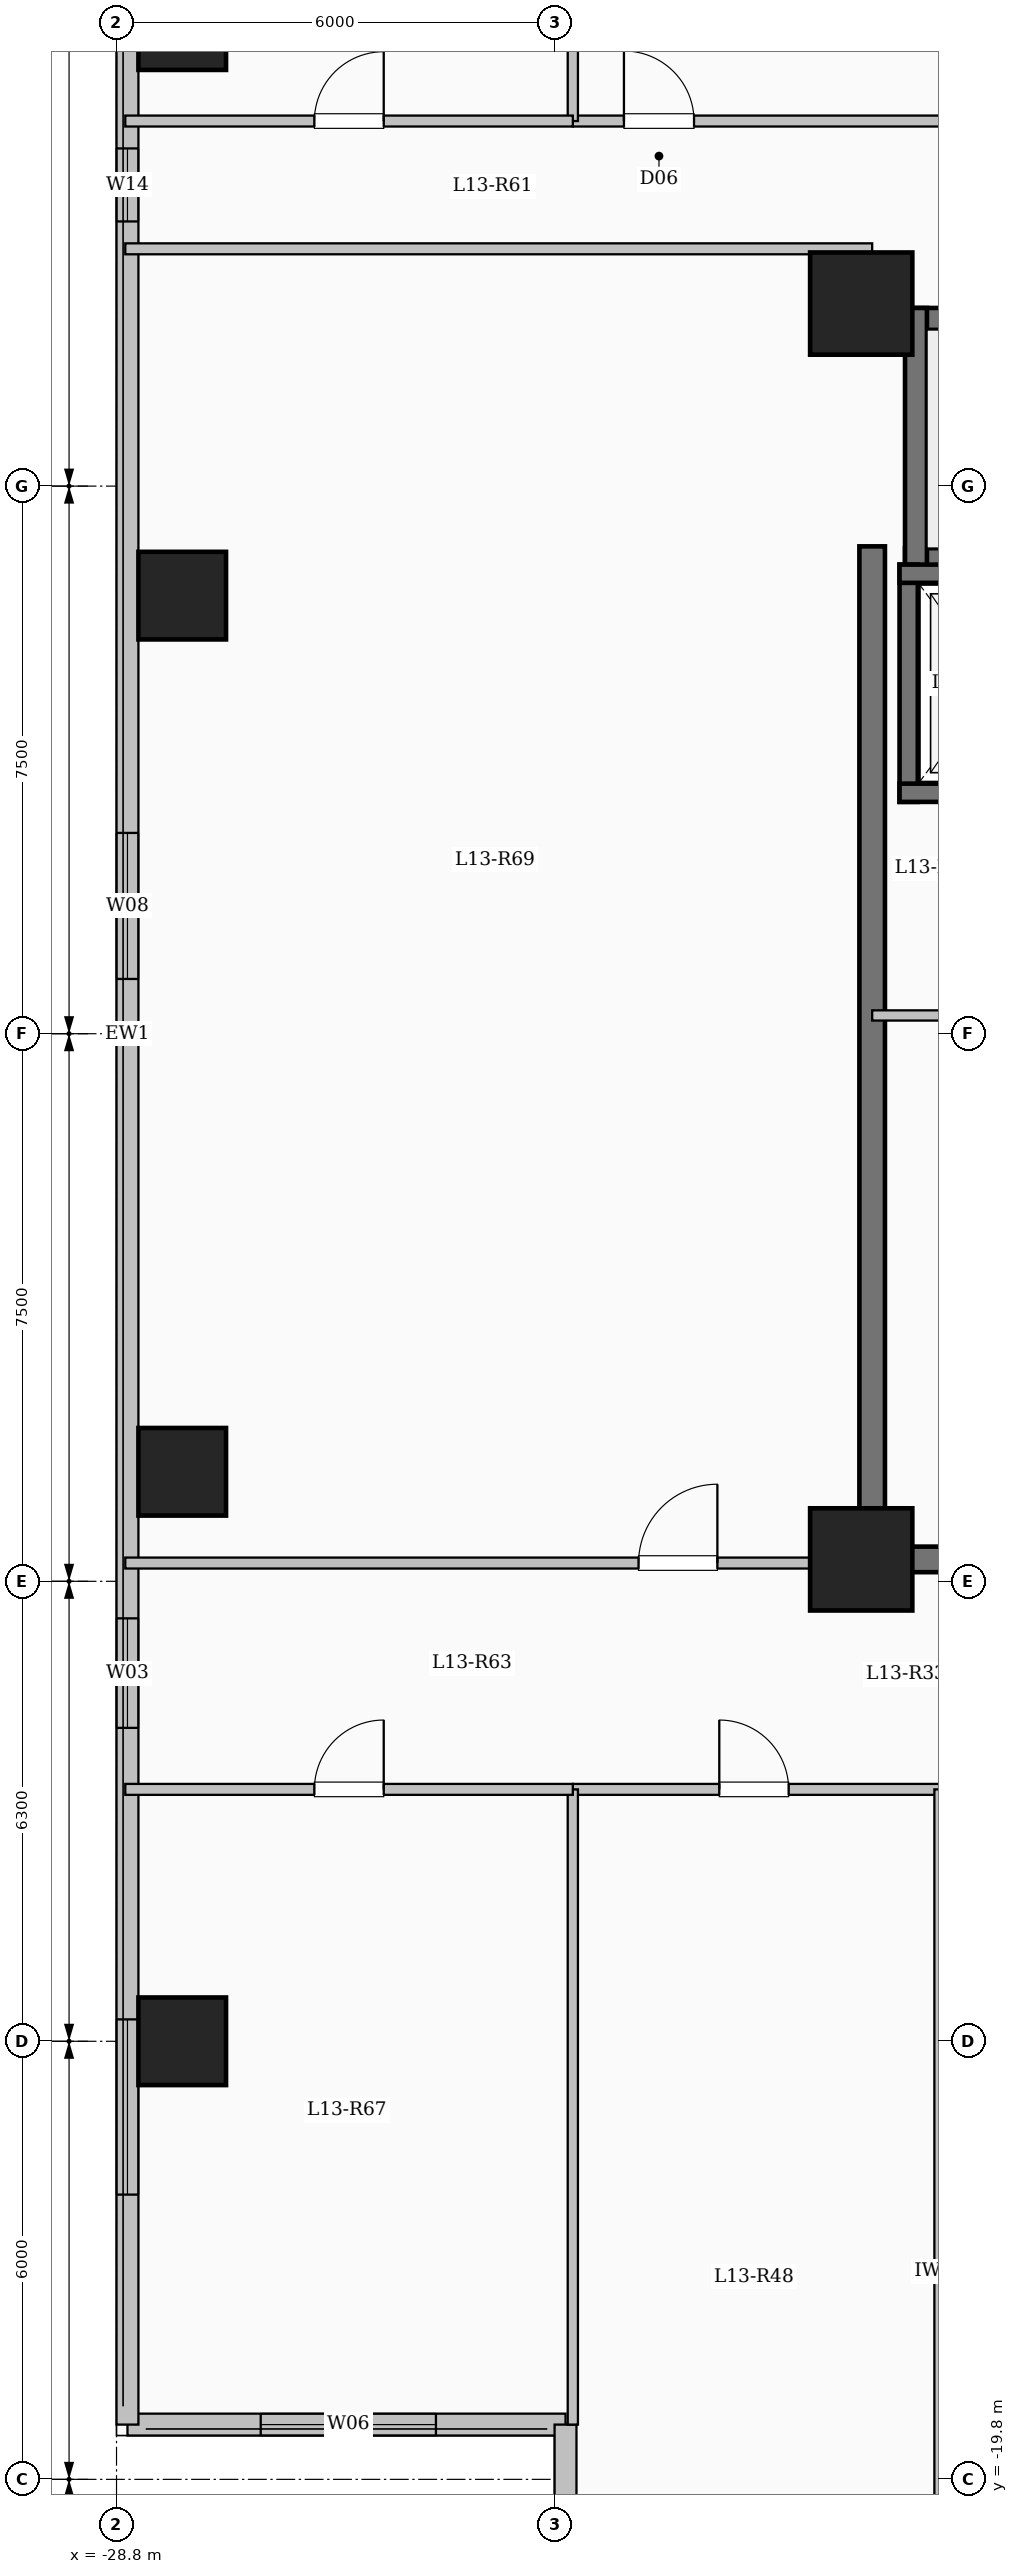
"""IFC4 building model, lengths in metres.
Left out: names, types, materials, properties, quantities, classifications, styles, units other than length and angle.
Written with IfcOpenShell. Run it as: python <this file> out.ifc"""

import sys

from ifc_helpers import new_model, si_unit, direction, frame, frame_2d, origin, origin_2d, place, context, subcontext, project, spatial, rectangle, extrude, element, fill, save


model = new_model("IFC4")
c1 = context("Model", 3, precision=1e-05, world=origin(), true_north=direction((0.0, 1.0)))
c2 = subcontext(c1, "Body", "Model", "MODEL_VIEW")
j1 = project(units=[si_unit("LENGTHUNIT", "METRE"), si_unit("PLANEANGLEUNIT", "RADIAN")], contexts=[c1])
p1 = place(None, origin())
s1 = spatial("IfcSite", under=j1, at=p1, CompositionType="ELEMENT")
p2 = place(p1, origin())
s2 = spatial("IfcBuilding", under=s1, at=p2, CompositionType="ELEMENT")
p3 = place(p2, frame((0.0, 0.0, 50.8)))
s3 = spatial("IfcBuildingStorey", under=s2, at=p3, CompositionType="ELEMENT", Elevation=50.8)
for number, where, z_axis, x_axis in (
    (1, (-18.6, -7.2, 0.0), (0.0, 0.0, 1.0), (1.0, 0.0, 0.0)),
    (2, (-18.6, 10.0, 0.0), (0.0, 0.0, 1.0), (1.0, 0.0, 0.0)),
):
    element("IfcColumn", number, at=place(p3, frame(where, z_axis=z_axis, x_axis=x_axis)), inside=s3, PredefinedType="COLUMN", context=c2, shape_type="SweptSolid", body=[
        extrude(rectangle(XDim=1.4, YDim=1.4, at=origin_2d()), origin(), (0.0, 0.0, 1.0), 3.35),
    ])
for number, where, z_axis, x_axis in (
    (3, (-27.9, -13.8, 0.0), (0.0, 0.0, 1.0), (1.0, 0.0, 0.0)),
    (4, (-27.9, -6.0, 0.0), (0.0, 0.0, 1.0), (1.0, 0.0, 0.0)),
    (5, (-27.9, 6.0, 0.0), (0.0, 0.0, 1.0), (1.0, 0.0, 0.0)),
    (6, (-27.9, 13.8, 0.0), (0.0, 0.0, 1.0), (1.0, 0.0, 0.0)),
):
    element("IfcColumn", number, at=place(p3, frame(where, z_axis=z_axis, x_axis=x_axis)), inside=s3, PredefinedType="COLUMN", context=c2, shape_type="SweptSolid", body=[
        extrude(rectangle(XDim=1.2, YDim=1.2, at=origin_2d()), origin(), (0.0, 0.0, 1.0), 3.35),
    ])
p4 = place(p3, frame((-22.65, -19.05, 0.0), z_axis=(0.0, 0.0, 1.0), x_axis=(-1.0, 0.0, 0.0)))
e7 = element("IfcWall", 7, at=p4, inside=s3, PredefinedType="SOLIDWALL", context=c2, shape_type="SweptSolid", body=[
    extrude(rectangle(XDim=6.0, YDim=0.3, at=frame_2d((3.0, 0.0))), origin(), (0.0, 0.0, 1.0), 3.1),
])
p5 = place(p4, frame((1.775, 0.0, 0.9)))
e8 = element("IfcOpeningElement", 8, at=p5, cuts=e7, PredefinedType="OPENING", context=c2, shape_type="SweptSolid", body=[
    extrude(rectangle(XDim=2.4, YDim=1.8, at=frame_2d((1.2, 0.9))), frame((0.0, 0.16, 0.0), z_axis=(0.0, -1.0, 0.0), x_axis=(1.0, 0.0, 0.0)), (0.0, 0.0, 1.0), 0.32),
])
p6 = place(p3, frame((-28.65, -19.05, 0.0), z_axis=(0.0, 0.0, 1.0), x_axis=(0.0, 1.0, 0.0)))
e9 = element("IfcWall", 9, at=p6, inside=s3, PredefinedType="SOLIDWALL", context=c2, shape_type="SweptSolid", body=[
    extrude(rectangle(XDim=38.1, YDim=0.3, at=frame_2d((19.05, 0.0))), origin(), (0.0, 0.0, 1.0), 3.1),
])
p7 = place(p6, frame((3.15, 0.0, 0.9)))
e10 = element("IfcOpeningElement", 10, at=p7, cuts=e9, PredefinedType="OPENING", context=c2, shape_type="SweptSolid", body=[
    extrude(rectangle(XDim=2.4, YDim=1.8, at=frame_2d((1.2, 0.9))), frame((0.0, 0.16, 0.0), z_axis=(0.0, -1.0, 0.0), x_axis=(1.0, 0.0, 0.0)), (0.0, 0.0, 1.0), 0.32),
])
p8 = place(p6, frame((9.542, 0.0, 0.9)))
e11 = element("IfcOpeningElement", 11, at=p8, cuts=e9, PredefinedType="OPENING", context=c2, shape_type="SweptSolid", body=[
    extrude(rectangle(XDim=1.5, YDim=1.65, at=frame_2d((0.75, 0.825))), frame((0.0, 0.16, 0.0), z_axis=(0.0, -1.0, 0.0), x_axis=(1.0, 0.0, 0.0)), (0.0, 0.0, 1.0), 0.32),
])
p9 = place(p6, frame((19.8, 0.0, 0.9)))
e12 = element("IfcOpeningElement", 12, at=p9, cuts=e9, PredefinedType="OPENING", context=c2, shape_type="SweptSolid", body=[
    extrude(rectangle(XDim=2.0, YDim=1.7, at=frame_2d((1.0, 0.85))), frame((0.0, 0.16, 0.0), z_axis=(0.0, -1.0, 0.0), x_axis=(1.0, 0.0, 0.0)), (0.0, 0.0, 1.0), 0.32),
])
p10 = place(p6, frame((30.175, 0.0, 0.95)))
e13 = element("IfcOpeningElement", 13, at=p10, cuts=e9, PredefinedType="OPENING", context=c2, shape_type="SweptSolid", body=[
    extrude(rectangle(XDim=1.0, YDim=1.5, at=frame_2d((0.5, 0.75))), frame((0.0, 0.16, 0.0), z_axis=(0.0, -1.0, 0.0), x_axis=(1.0, 0.0, 0.0)), (0.0, 0.0, 1.0), 0.32),
])
p11 = place(p6, frame((33.85, 0.0, 0.9)))
e14 = element("IfcOpeningElement", 14, at=p11, cuts=e9, PredefinedType="OPENING", context=c2, shape_type="SweptSolid", body=[
    extrude(rectangle(XDim=2.0, YDim=1.7, at=frame_2d((1.0, 0.85))), frame((0.0, 0.16, 0.0), z_axis=(0.0, -1.0, 0.0), x_axis=(1.0, 0.0, 0.0)), (0.0, 0.0, 1.0), 0.32),
])
p12 = place(p3, frame((-22.65, -23.55, 0.0), z_axis=(0.0, 0.0, 1.0), x_axis=(0.0, 1.0, 0.0)))
e15 = element("IfcWall", 15, at=p12, inside=s3, PredefinedType="SOLIDWALL", context=c2, shape_type="SweptSolid", body=[
    extrude(rectangle(XDim=4.5, YDim=0.3, at=frame_2d((2.25, 0.0))), origin(), (0.0, 0.0, 1.0), 3.1),
])
p13 = place(p12, frame((1.268, 0.0, 0.9)))
e16 = element("IfcOpeningElement", 16, at=p13, cuts=e15, PredefinedType="OPENING", context=c2, shape_type="SweptSolid", body=[
    extrude(rectangle(XDim=2.0, YDim=1.7, at=frame_2d((1.0, 0.85))), frame((0.0, 0.16, 0.0), z_axis=(0.0, -1.0, 0.0), x_axis=(1.0, 0.0, 0.0)), (0.0, 0.0, 1.0), 0.32),
])
p14 = place(p3, frame((-18.0, 9.79, 0.0), z_axis=(0.0, 0.0, 1.0), x_axis=(1.0, 0.0, 0.0)))
e17 = element("IfcWall", 17, at=p14, inside=s3, PredefinedType="SHEAR", context=c2, shape_type="SweptSolid", body=[
    extrude(rectangle(XDim=8.0, YDim=0.3, at=frame_2d((4.0, 0.0))), origin(), (0.0, 0.0, 1.0), 3.35),
])
p15 = place(p3, frame((-18.0, 6.5, 0.0), z_axis=(0.0, 0.0, 1.0), x_axis=(1.0, 0.0, 0.0)))
e18 = element("IfcWall", 18, at=p15, inside=s3, PredefinedType="SHEAR", context=c2, shape_type="SweptSolid", body=[
    extrude(rectangle(XDim=8.0, YDim=0.3, at=frame_2d((4.0, 0.0))), origin(), (0.0, 0.0, 1.0), 3.35),
])
p16 = place(p15, frame((6.45, 0.0, 0.0)))
e19 = element("IfcOpeningElement", 19, at=p16, cuts=e18, PredefinedType="OPENING", context=c2, shape_type="SweptSolid", body=[
    extrude(rectangle(XDim=1.0, YDim=2.15, at=frame_2d((0.5, 1.075))), frame((0.0, 0.16, 0.0), z_axis=(0.0, -1.0, 0.0), x_axis=(1.0, 0.0, 0.0)), (0.0, 0.0, 1.0), 0.32),
])
p17 = place(p3, frame((-17.85, 6.35, 0.0), z_axis=(0.0, 0.0, 1.0), x_axis=(0.0, 1.0, 0.0)))
e20 = element("IfcWall", 20, at=p17, inside=s3, PredefinedType="SHEAR", context=c2, shape_type="SweptSolid", body=[
    extrude(rectangle(XDim=3.59, YDim=0.3, at=frame_2d((1.795, 0.0))), origin(), (0.0, 0.0, 1.0), 3.35),
])
p18 = place(p3, frame((-17.95, 3.175, 0.0), z_axis=(0.0, 0.0, 1.0), x_axis=(0.0, 1.0, 0.0)))
e21 = element("IfcWall", 21, at=p18, inside=s3, PredefinedType="SHEAR", context=c2, shape_type="SweptSolid", body=[
    extrude(rectangle(XDim=3.25, YDim=0.25, at=frame_2d((1.625, 0.0))), origin(), (0.0, 0.0, 1.0), 3.35),
])
for number, where, z_axis, x_axis in (
    (22, (-18.075, 3.3, 0.0), (0.0, 0.0, 1.0), (1.0, 0.0, 0.0)),
    (23, (-18.075, 6.3, 0.0), (0.0, 0.0, 1.0), (1.0, 0.0, 0.0)),
):
    element("IfcWall", number, at=place(p3, frame(where, z_axis=z_axis, x_axis=x_axis)), inside=s3, PredefinedType="SHEAR", context=c2, shape_type="SweptSolid", body=[
        extrude(rectangle(XDim=2.55, YDim=0.25, at=frame_2d((1.275, 0.0))), origin(), (0.0, 0.0, 1.0), 3.35),
    ])
p19 = place(p3, frame((-18.45, -7.375, 0.0), z_axis=(0.0, 0.0, 1.0), x_axis=(0.0, 1.0, 0.0)))
e24 = element("IfcWall", 24, at=p19, inside=s3, PredefinedType="SHEAR", context=c2, shape_type="SweptSolid", body=[
    extrude(rectangle(XDim=14.05, YDim=0.35, at=frame_2d((7.025, 0.0))), origin(), (0.0, 0.0, 1.0), 3.35),
])
p20 = place(p3, frame((-18.625, -7.2, 0.0), z_axis=(0.0, 0.0, 1.0), x_axis=(1.0, 0.0, 0.0)))
e25 = element("IfcWall", 25, at=p20, inside=s3, PredefinedType="SHEAR", context=c2, shape_type="SweptSolid", body=[
    extrude(rectangle(XDim=8.55, YDim=0.35, at=frame_2d((4.275, 0.0))), origin(), (0.0, 0.0, 1.0), 3.35),
])
p21 = place(p3, frame((-18.45, 0.25, 0.0), z_axis=(0.0, 0.0, 1.0), x_axis=(1.0, 0.0, 0.0)))
e26 = element("IfcWall", 26, at=p21, inside=s3, PredefinedType="PARTITIONING", context=c2, shape_type="SweptSolid", body=[
    extrude(rectangle(XDim=3.05, YDim=0.14, at=frame_2d((1.525, 0.0))), origin(), (0.0, 0.0, 1.0), 3.1),
])
p22 = place(p21, frame((1.05, 0.0, 0.0)))
e27 = element("IfcOpeningElement", 27, at=p22, cuts=e26, PredefinedType="OPENING", context=c2, shape_type="SweptSolid", body=[
    extrude(rectangle(XDim=0.9, YDim=2.08, at=frame_2d((0.45, 1.04))), frame((0.0, 0.08, 0.0), z_axis=(0.0, -1.0, 0.0), x_axis=(1.0, 0.0, 0.0)), (0.0, 0.0, 1.0), 0.16),
])
p23 = place(p3, frame((-22.55, 12.5, 0.0), z_axis=(0.0, 0.0, 1.0), x_axis=(1.0, 0.0, 0.0)))
e28 = element("IfcWall", 28, at=p23, inside=s3, PredefinedType="PARTITIONING", context=c2, shape_type="SweptSolid", body=[
    extrude(rectangle(XDim=18.7, YDim=0.15, at=frame_2d((9.35, 0.0))), origin(), (0.0, 0.0, 1.0), 3.1),
])
p24 = place(p23, frame((0.7, 0.0, 0.0)))
e29 = element("IfcOpeningElement", 29, at=p24, cuts=e28, PredefinedType="OPENING", context=c2, shape_type="SweptSolid", body=[
    extrude(rectangle(XDim=0.96, YDim=2.15, at=frame_2d((0.48, 1.075))), frame((0.0, 0.085, 0.0), z_axis=(0.0, -1.0, 0.0), x_axis=(1.0, 0.0, 0.0)), (0.0, 0.0, 1.0), 0.17),
])
p25 = place(p3, frame((-22.55, -10.35, 0.0), z_axis=(0.0, 0.0, 1.0), x_axis=(1.0, 0.0, 0.0)))
e30 = element("IfcWall", 30, at=p25, inside=s3, PredefinedType="PARTITIONING", context=c2, shape_type="SweptSolid", body=[
    extrude(rectangle(XDim=14.0, YDim=0.15, at=frame_2d((7.0, 0.0))), origin(), (0.0, 0.0, 1.0), 3.1),
])
p26 = place(p25, frame((2.006, 0.0, 0.0)))
e31 = element("IfcOpeningElement", 31, at=p26, cuts=e30, PredefinedType="OPENING", context=c2, shape_type="SweptSolid", body=[
    extrude(rectangle(XDim=0.95, YDim=2.15, at=frame_2d((0.475, 1.075))), frame((0.0, 0.085, 0.0), z_axis=(0.0, -1.0, 0.0), x_axis=(1.0, 0.0, 0.0)), (0.0, 0.0, 1.0), 0.17),
])
p27 = place(p25, frame((7.058, 0.0, 0.0)))
e32 = element("IfcOpeningElement", 32, at=p27, cuts=e30, PredefinedType="OPENING", context=c2, shape_type="SweptSolid", body=[
    extrude(rectangle(XDim=0.95, YDim=2.15, at=frame_2d((0.475, 1.075))), frame((0.0, 0.085, 0.0), z_axis=(0.0, -1.0, 0.0), x_axis=(1.0, 0.0, 0.0)), (0.0, 0.0, 1.0), 0.17),
])
p28 = place(p25, frame((11.552, 0.0, 0.0)))
e33 = element("IfcOpeningElement", 33, at=p28, cuts=e30, PredefinedType="OPENING", context=c2, shape_type="SweptSolid", body=[
    extrude(rectangle(XDim=0.95, YDim=2.15, at=frame_2d((0.475, 1.075))), frame((0.0, 0.085, 0.0), z_axis=(0.0, -1.0, 0.0), x_axis=(1.0, 0.0, 0.0)), (0.0, 0.0, 1.0), 0.17),
])
p29 = place(p3, frame((-17.528, -23.55, 0.0), z_axis=(0.0, 0.0, 1.0), x_axis=(0.0, 1.0, 0.0)))
e34 = element("IfcWall", 34, at=p29, inside=s3, PredefinedType="PARTITIONING", context=c2, shape_type="SweptSolid", body=[
    extrude(rectangle(XDim=13.2, YDim=0.14, at=frame_2d((6.6, 0.0))), origin(), (0.0, 0.0, 1.0), 3.1),
])
p30 = place(p3, frame((-28.68, -7.25, 0.0), z_axis=(0.0, 0.0, 1.0), x_axis=(1.0, 0.0, 0.0)))
e35 = element("IfcWall", 35, at=p30, inside=s3, PredefinedType="PARTITIONING", context=c2, shape_type="SweptSolid", body=[
    extrude(rectangle(XDim=10.23, YDim=0.15, at=frame_2d((5.115, 0.0))), origin(), (0.0, 0.0, 1.0), 3.1),
])
p31 = place(p30, frame((7.03, 0.0, 0.0)))
e36 = element("IfcOpeningElement", 36, at=p31, cuts=e35, PredefinedType="OPENING", context=c2, shape_type="SweptSolid", body=[
    extrude(rectangle(XDim=1.08, YDim=2.15, at=frame_2d((0.54, 1.075))), frame((0.0, 0.085, 0.0), z_axis=(0.0, -1.0, 0.0), x_axis=(1.0, 0.0, 0.0)), (0.0, 0.0, 1.0), 0.17),
])
p32 = place(p3, frame((-28.68, 10.75, 0.0), z_axis=(0.0, 0.0, 1.0), x_axis=(1.0, 0.0, 0.0)))
e37 = element("IfcWall", 37, at=p32, inside=s3, PredefinedType="PARTITIONING", context=c2, shape_type="SweptSolid", body=[
    extrude(rectangle(XDim=10.23, YDim=0.15, at=frame_2d((5.115, 0.0))), origin(), (0.0, 0.0, 1.0), 3.1),
])
p33 = place(p3, frame((-22.55, -19.05, 0.0), z_axis=(0.0, 0.0, 1.0), x_axis=(0.0, 1.0, 0.0)))
e38 = element("IfcWall", 38, at=p33, inside=s3, PredefinedType="PARTITIONING", context=c2, shape_type="SweptSolid", body=[
    extrude(rectangle(XDim=8.7, YDim=0.14, at=frame_2d((4.35, 0.0))), origin(), (0.0, 0.0, 1.0), 3.1),
])
p34 = place(p3, frame((-22.55, 12.5, 0.0), z_axis=(0.0, 0.0, 1.0), x_axis=(0.0, 1.0, 0.0)))
e39 = element("IfcWall", 39, at=p34, inside=s3, PredefinedType="PARTITIONING", context=c2, shape_type="SweptSolid", body=[
    extrude(rectangle(XDim=6.55, YDim=0.14, at=frame_2d((3.275, 0.0))), origin(), (0.0, 0.0, 1.0), 3.1),
])
p35 = place(p3, frame((-28.68, 12.5, 0.0), z_axis=(0.0, 0.0, 1.0), x_axis=(1.0, 0.0, 0.0)))
e40 = element("IfcWall", 40, at=p35, inside=s3, PredefinedType="PARTITIONING", context=c2, shape_type="SweptSolid", body=[
    extrude(rectangle(XDim=6.13, YDim=0.15, at=frame_2d((3.065, 0.0))), origin(), (0.0, 0.0, 1.0), 3.1),
])
p36 = place(p35, frame((2.59, 0.0, 0.0)))
e41 = element("IfcOpeningElement", 41, at=p36, cuts=e40, PredefinedType="OPENING", context=c2, shape_type="SweptSolid", body=[
    extrude(rectangle(XDim=0.95, YDim=2.15, at=frame_2d((0.475, 1.075))), frame((0.0, 0.085, 0.0), z_axis=(0.0, -1.0, 0.0), x_axis=(1.0, 0.0, 0.0)), (0.0, 0.0, 1.0), 0.17),
])
p37 = place(p3, frame((-28.68, -10.35, 0.0), z_axis=(0.0, 0.0, 1.0), x_axis=(1.0, 0.0, 0.0)))
e42 = element("IfcWall", 42, at=p37, inside=s3, PredefinedType="PARTITIONING", context=c2, shape_type="SweptSolid", body=[
    extrude(rectangle(XDim=6.13, YDim=0.15, at=frame_2d((3.065, 0.0))), origin(), (0.0, 0.0, 1.0), 3.1),
])
p38 = place(p37, frame((2.59, 0.0, 0.0)))
e43 = element("IfcOpeningElement", 43, at=p38, cuts=e42, PredefinedType="OPENING", context=c2, shape_type="SweptSolid", body=[
    extrude(rectangle(XDim=0.95, YDim=2.15, at=frame_2d((0.475, 1.075))), frame((0.0, 0.085, 0.0), z_axis=(0.0, -1.0, 0.0), x_axis=(1.0, 0.0, 0.0)), (0.0, 0.0, 1.0), 0.17),
])
p39 = place(p5, origin())
e44 = element("IfcWindow", 44, at=p39, inside=s3, PartitioningType="SINGLE_PANEL", PredefinedType="WINDOW", context=c2, shape_type="SweptSolid", body=[
    extrude(rectangle(XDim=2.4, YDim=1.8, at=frame_2d((1.2, 0.9))), frame((0.0, 0.03, 0.0), z_axis=(0.0, -1.0, 0.0), x_axis=(1.0, 0.0, 0.0)), (0.0, 0.0, 1.0), 0.06),
])
fill(e8, e44)
p40 = place(p7, origin())
e45 = element("IfcWindow", 45, at=p40, inside=s3, PartitioningType="SINGLE_PANEL", PredefinedType="WINDOW", context=c2, shape_type="SweptSolid", body=[
    extrude(rectangle(XDim=2.4, YDim=1.8, at=frame_2d((1.2, 0.9))), frame((0.0, 0.03, 0.0), z_axis=(0.0, -1.0, 0.0), x_axis=(1.0, 0.0, 0.0)), (0.0, 0.0, 1.0), 0.06),
])
fill(e10, e45)
p41 = place(p8, origin())
e46 = element("IfcWindow", 46, at=p41, inside=s3, PartitioningType="SINGLE_PANEL", PredefinedType="WINDOW", context=c2, shape_type="SweptSolid", body=[
    extrude(rectangle(XDim=1.5, YDim=1.65, at=frame_2d((0.75, 0.825))), frame((0.0, 0.03, 0.0), z_axis=(0.0, -1.0, 0.0), x_axis=(1.0, 0.0, 0.0)), (0.0, 0.0, 1.0), 0.06),
])
fill(e11, e46)
p42 = place(p9, origin())
e47 = element("IfcWindow", 47, at=p42, inside=s3, PartitioningType="SINGLE_PANEL", PredefinedType="WINDOW", context=c2, shape_type="SweptSolid", body=[
    extrude(rectangle(XDim=2.0, YDim=1.7, at=frame_2d((1.0, 0.85))), frame((0.0, 0.03, 0.0), z_axis=(0.0, -1.0, 0.0), x_axis=(1.0, 0.0, 0.0)), (0.0, 0.0, 1.0), 0.06),
])
fill(e12, e47)
p43 = place(p10, origin())
e48 = element("IfcWindow", 48, at=p43, inside=s3, PartitioningType="SINGLE_PANEL", PredefinedType="WINDOW", context=c2, shape_type="SweptSolid", body=[
    extrude(rectangle(XDim=1.0, YDim=1.5, at=frame_2d((0.5, 0.75))), frame((0.0, 0.03, 0.0), z_axis=(0.0, -1.0, 0.0), x_axis=(1.0, 0.0, 0.0)), (0.0, 0.0, 1.0), 0.06),
])
fill(e13, e48)
p44 = place(p24, origin())
e49 = element("IfcDoor", 49, at=p44, inside=s3, OperationType="SINGLE_SWING_LEFT", PredefinedType="DOOR", context=c2, shape_type="SweptSolid", body=[
    extrude(rectangle(XDim=0.96, YDim=2.15, at=frame_2d((0.48, 1.075))), frame((0.0, 0.025, 0.0), z_axis=(0.0, -1.0, 0.0), x_axis=(1.0, 0.0, 0.0)), (0.0, 0.0, 1.0), 0.05),
])
fill(e29, e49)
p45 = place(p26, origin())
e50 = element("IfcDoor", 50, at=p45, inside=s3, OperationType="SINGLE_SWING_LEFT", PredefinedType="DOOR", context=c2, shape_type="SweptSolid", body=[
    extrude(rectangle(XDim=0.95, YDim=2.15, at=frame_2d((0.475, 1.075))), frame((0.0, 0.025, 0.0), z_axis=(0.0, -1.0, 0.0), x_axis=(1.0, 0.0, 0.0)), (0.0, 0.0, 1.0), 0.05),
])
fill(e31, e50)
p46 = place(p36, origin())
e51 = element("IfcDoor", 51, at=p46, inside=s3, OperationType="SINGLE_SWING_RIGHT", PredefinedType="DOOR", context=c2, shape_type="SweptSolid", body=[
    extrude(rectangle(XDim=0.95, YDim=2.15, at=frame_2d((0.475, 1.075))), frame((0.0, 0.025, 0.0), z_axis=(0.0, -1.0, 0.0), x_axis=(1.0, 0.0, 0.0)), (0.0, 0.0, 1.0), 0.05),
])
fill(e41, e51)
p47 = place(p38, origin())
e52 = element("IfcDoor", 52, at=p47, inside=s3, OperationType="SINGLE_SWING_RIGHT", PredefinedType="DOOR", context=c2, shape_type="SweptSolid", body=[
    extrude(rectangle(XDim=0.95, YDim=2.15, at=frame_2d((0.475, 1.075))), frame((0.0, 0.025, 0.0), z_axis=(0.0, -1.0, 0.0), x_axis=(1.0, 0.0, 0.0)), (0.0, 0.0, 1.0), 0.05),
])
fill(e43, e52)
p48 = place(p31, origin())
e53 = element("IfcDoor", 53, at=p48, inside=s3, OperationType="SINGLE_SWING_RIGHT", PredefinedType="DOOR", context=c2, shape_type="SweptSolid", body=[
    extrude(rectangle(XDim=1.08, YDim=2.15, at=frame_2d((0.54, 1.075))), frame((0.0, 0.025, 0.0), z_axis=(0.0, -1.0, 0.0), x_axis=(1.0, 0.0, 0.0)), (0.0, 0.0, 1.0), 0.05),
])
fill(e36, e53)
save(model, sys.argv[1])
